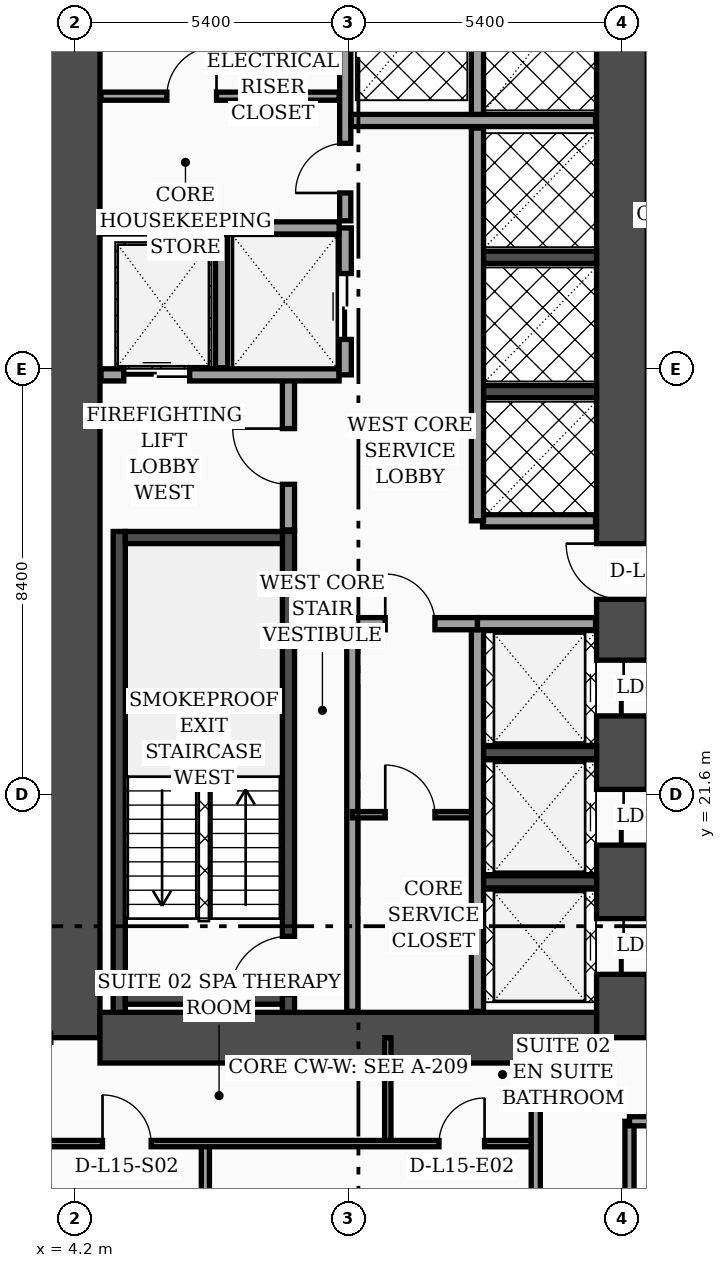
"""IFC4 building model, lengths in metres.
Left out: names, types, materials, properties, quantities, classifications, styles, units other than length and angle.
Written with IfcOpenShell. Run it as: python <this file> out.ifc"""

import sys

from ifc_helpers import new_model, si_unit, direction, frame, frame_2d, origin, place, context, subcontext, project, spatial, rectangle, extrude, element, fill, save


model = new_model("IFC4")
c1 = context("Model", 3, precision=1e-05, world=origin(), true_north=direction((0.0, 1.0)))
c2 = subcontext(c1, "Body", "Model", "MODEL_VIEW")
j1 = project(units=[si_unit("LENGTHUNIT", "METRE"), si_unit("PLANEANGLEUNIT", "RADIAN")], contexts=[c1])
p1 = place(None, origin())
s1 = spatial("IfcSite", under=j1, at=p1, CompositionType="ELEMENT")
p2 = place(p1, origin())
s2 = spatial("IfcBuilding", under=s1, at=p2, CompositionType="ELEMENT")
p3 = place(p2, frame((0.0, 0.0, 66.0)))
s3 = spatial("IfcBuildingStorey", under=s2, at=p3, CompositionType="ELEMENT", Elevation=66.0)
p4 = place(p3, frame((4.2, 16.8, 0.0), z_axis=(0.0, 0.0, 1.0), x_axis=(0.0, 1.0, 0.0)))
e1 = element("IfcWall", 1, at=p4, inside=s3, PredefinedType="SHEAR", context=c2, shape_type="SweptSolid", body=[
    extrude(rectangle(XDim=21.6, YDim=1.0, at=frame_2d((10.8, 0.0))), origin(), (0.0, 0.0, 1.0), 3.56),
])
p5 = place(p3, frame((15.0, 16.8, 0.0), z_axis=(0.0, 0.0, 1.0), x_axis=(0.0, 1.0, 0.0)))
e2 = element("IfcWall", 2, at=p5, inside=s3, PredefinedType="SHEAR", context=c2, shape_type="SweptSolid", body=[
    extrude(rectangle(XDim=21.6, YDim=1.0, at=frame_2d((10.8, 0.0))), origin(), (0.0, 0.0, 1.0), 3.56),
])
p6 = place(p5, frame((8.65, 0.0, 0.0)))
e3 = element("IfcOpeningElement", 3, at=p6, cuts=e2, PredefinedType="OPENING", context=c2, shape_type="SweptSolid", body=[
    extrude(rectangle(XDim=1.1, YDim=2.2, at=frame_2d((0.55, 1.1))), frame((0.0, 0.51, 0.0), z_axis=(0.0, -1.0, 0.0), x_axis=(1.0, 0.0, 0.0)), (0.0, 0.0, 1.0), 1.02),
])
p7 = place(p5, frame((1.25, 0.0, 0.0)))
e4 = element("IfcOpeningElement", 4, at=p7, cuts=e2, PredefinedType="OPENING", context=c2, shape_type="SweptSolid", body=[
    extrude(rectangle(XDim=1.1, YDim=2.2, at=frame_2d((0.55, 1.1))), frame((0.0, 0.51, 0.0), z_axis=(0.0, -1.0, 0.0), x_axis=(1.0, 0.0, 0.0)), (0.0, 0.0, 1.0), 1.02),
])
p8 = place(p5, frame((3.8, 0.0, 0.0)))
e5 = element("IfcOpeningElement", 5, at=p8, cuts=e2, PredefinedType="OPENING", context=c2, shape_type="SweptSolid", body=[
    extrude(rectangle(XDim=1.1, YDim=2.2, at=frame_2d((0.55, 1.1))), frame((0.0, 0.51, 0.0), z_axis=(0.0, -1.0, 0.0), x_axis=(1.0, 0.0, 0.0)), (0.0, 0.0, 1.0), 1.02),
])
p9 = place(p5, frame((6.35, 0.0, 0.0)))
e6 = element("IfcOpeningElement", 6, at=p9, cuts=e2, PredefinedType="OPENING", context=c2, shape_type="SweptSolid", body=[
    extrude(rectangle(XDim=1.1, YDim=2.2, at=frame_2d((0.55, 1.1))), frame((0.0, 0.51, 0.0), z_axis=(0.0, -1.0, 0.0), x_axis=(1.0, 0.0, 0.0)), (0.0, 0.0, 1.0), 1.02),
])
p10 = place(p3, frame((4.7, 16.8, 0.0), z_axis=(0.0, 0.0, 1.0), x_axis=(1.0, 0.0, 0.0)))
e7 = element("IfcWall", 7, at=p10, inside=s3, PredefinedType="SHEAR", context=c2, shape_type="SweptSolid", body=[
    extrude(rectangle(XDim=9.8, YDim=1.0, at=frame_2d((4.9, 0.0))), origin(), (0.0, 0.0, 1.0), 3.56),
])
p11 = place(p3, frame((5.08, 17.3, 0.0), z_axis=(0.0, 0.0, 1.0), x_axis=(0.0, 1.0, 0.0)))
e8 = element("IfcWall", 8, at=p11, inside=s3, PredefinedType="SOLIDWALL", context=c2, shape_type="SweptSolid", body=[
    extrude(rectangle(XDim=9.49, YDim=0.24, at=frame_2d((4.745, 0.0))), origin(), (0.0, 0.0, 1.0), 3.56),
])
p12 = place(p3, frame((8.42, 17.3, 0.0), z_axis=(0.0, 0.0, 1.0), x_axis=(0.0, 1.0, 0.0)))
e9 = element("IfcWall", 9, at=p12, inside=s3, PredefinedType="SOLIDWALL", context=c2, shape_type="SweptSolid", body=[
    extrude(rectangle(XDim=9.49, YDim=0.24, at=frame_2d((4.745, 0.0))), origin(), (0.0, 0.0, 1.0), 3.56),
])
p13 = place(p12, frame((0.35, 0.0, 0.0)))
e10 = element("IfcOpeningElement", 10, at=p13, cuts=e9, PredefinedType="OPENING", context=c2, shape_type="SweptSolid", body=[
    extrude(rectangle(XDim=1.15, YDim=2.2, at=frame_2d((0.575, 1.1))), frame((0.0, 0.13, 0.0), z_axis=(0.0, -1.0, 0.0), x_axis=(1.0, 0.0, 0.0)), (0.0, 0.0, 1.0), 0.26),
])
for number, where, z_axis, x_axis in (
    (11, (5.2, 17.58, 0.0), (0.0, 0.0, 1.0), (1.0, 0.0, 0.0)),
    (12, (5.2, 26.67, 0.0), (0.0, 0.0, 1.0), (1.0, 0.0, 0.0)),
):
    element("IfcWall", number, at=place(p3, frame(where, z_axis=z_axis, x_axis=x_axis)), inside=s3, PredefinedType="SOLIDWALL", context=c2, shape_type="SweptSolid", body=[
        extrude(rectangle(XDim=3.1, YDim=0.24, at=frame_2d((1.55, 0.0))), origin(), (0.0, 0.0, 1.0), 3.56),
    ])
for number, where, z_axis, x_axis in (
    (13, (12.18, 19.875, 0.0), (0.0, 0.0, 1.0), (1.0, 0.0, 0.0)),
    (14, (12.18, 22.425, 0.0), (0.0, 0.0, 1.0), (1.0, 0.0, 0.0)),
    (15, (12.18, 29.55, 0.0), (0.0, 0.0, 1.0), (1.0, 0.0, 0.0)),
    (16, (12.18, 32.2, 0.0), (0.0, 0.0, 1.0), (1.0, 0.0, 0.0)),
):
    element("IfcWall", number, at=place(p3, frame(where, z_axis=z_axis, x_axis=x_axis)), inside=s3, PredefinedType="SOLIDWALL", context=c2, shape_type="SweptSolid", body=[
        extrude(rectangle(XDim=2.32, YDim=0.24, at=frame_2d((1.16, 0.0))), origin(), (0.0, 0.0, 1.0), 3.56),
    ])
p14 = place(p3, frame((8.42, 26.82, 0.0), z_axis=(0.0, 0.0, 1.0), x_axis=(0.0, 1.0, 0.0)))
e17 = element("IfcWall", 17, at=p14, inside=s3, PredefinedType="SOLIDWALL", context=c2, shape_type="SweptSolid", body=[
    extrude(rectangle(XDim=3.0, YDim=0.24, at=frame_2d((1.5, 0.0))), origin(), (0.0, 0.0, 1.0), 3.56),
])
p15 = place(p14, frame((0.9, 0.0, 0.0)))
e18 = element("IfcOpeningElement", 18, at=p15, cuts=e17, PredefinedType="OPENING", context=c2, shape_type="SweptSolid", body=[
    extrude(rectangle(XDim=1.1, YDim=2.2, at=frame_2d((0.55, 1.1))), frame((0.0, 0.13, 0.0), z_axis=(0.0, -1.0, 0.0), x_axis=(1.0, 0.0, 0.0)), (0.0, 0.0, 1.0), 0.26),
])
p16 = place(p3, frame((4.72, 29.88, 0.0), z_axis=(0.0, 0.0, 1.0), x_axis=(1.0, 0.0, 0.0)))
e19 = element("IfcWall", 19, at=p16, inside=s3, PredefinedType="SOLIDWALL", context=c2, shape_type="SweptSolid", body=[
    extrude(rectangle(XDim=4.7, YDim=0.24, at=frame_2d((2.35, 0.0))), origin(), (0.0, 0.0, 1.0), 3.56),
])
p17 = place(p16, frame((0.45, 0.0, 0.0)))
e20 = element("IfcOpeningElement", 20, at=p17, cuts=e19, PredefinedType="OPENING", context=c2, shape_type="SweptSolid", body=[
    extrude(rectangle(XDim=1.3, YDim=2.35, at=frame_2d((0.65, 1.175))), frame((0.0, 0.13, 0.0), z_axis=(0.0, -1.0, 0.0), x_axis=(1.0, 0.0, 0.0)), (0.0, 0.0, 1.0), 0.26),
])
p18 = place(p3, frame((7.1, 30.02, 0.0), z_axis=(0.0, 0.0, 1.0), x_axis=(0.0, 1.0, 0.0)))
e21 = element("IfcWall", 21, at=p18, inside=s3, PredefinedType="SOLIDWALL", context=c2, shape_type="SweptSolid", body=[
    extrude(rectangle(XDim=2.63, YDim=0.24, at=frame_2d((1.315, 0.0))), origin(), (0.0, 0.0, 1.0), 3.56),
])
p19 = place(p3, frame((9.54, 29.88, 0.0), z_axis=(0.0, 0.0, 1.0), x_axis=(0.0, 1.0, 0.0)))
e22 = element("IfcWall", 22, at=p19, inside=s3, PredefinedType="SOLIDWALL", context=c2, shape_type="SweptSolid", body=[
    extrude(rectangle(XDim=2.9, YDim=0.24, at=frame_2d((1.45, 0.0))), origin(), (0.0, 0.0, 1.0), 3.56),
])
p20 = place(p19, frame((0.7, 0.0, 0.0)))
e23 = element("IfcOpeningElement", 23, at=p20, cuts=e22, PredefinedType="OPENING", context=c2, shape_type="SweptSolid", body=[
    extrude(rectangle(XDim=1.3, YDim=2.35, at=frame_2d((0.65, 1.175))), frame((0.0, 0.13, 0.0), z_axis=(0.0, -1.0, 0.0), x_axis=(1.0, 0.0, 0.0)), (0.0, 0.0, 1.0), 0.26),
])
p21 = place(p3, frame((4.72, 32.78, 0.0), z_axis=(0.0, 0.0, 1.0), x_axis=(1.0, 0.0, 0.0)))
e24 = element("IfcWall", 24, at=p21, inside=s3, PredefinedType="SOLIDWALL", context=c2, shape_type="SweptSolid", body=[
    extrude(rectangle(XDim=4.7, YDim=0.24, at=frame_2d((2.35, 0.0))), origin(), (0.0, 0.0, 1.0), 3.56),
])
p22 = place(p3, frame((9.68, 17.32, 0.0), z_axis=(0.0, 0.0, 1.0), x_axis=(0.0, 1.0, 0.0)))
e25 = element("IfcWall", 25, at=p22, inside=s3, PredefinedType="SOLIDWALL", context=c2, shape_type="SweptSolid", body=[
    extrude(rectangle(XDim=7.68, YDim=0.22, at=frame_2d((3.84, 0.0))), origin(), (0.0, 0.0, 1.0), 3.56),
])
p23 = place(p3, frame((4.72, 35.38, 0.0), z_axis=(0.0, 0.0, 1.0), x_axis=(1.0, 0.0, 0.0)))
e26 = element("IfcWall", 26, at=p23, inside=s3, PredefinedType="PARTITIONING", context=c2, shape_type="SweptSolid", body=[
    extrude(rectangle(XDim=4.7, YDim=0.16, at=frame_2d((2.35, 0.0))), origin(), (0.0, 0.0, 1.0), 3.56),
])
p24 = place(p23, frame((1.3, 0.0, 0.0)))
e27 = element("IfcOpeningElement", 27, at=p24, cuts=e26, PredefinedType="OPENING", context=c2, shape_type="SweptSolid", body=[
    extrude(rectangle(XDim=0.98, YDim=2.15, at=frame_2d((0.49, 1.075))), frame((0.0, 0.09, 0.0), z_axis=(0.0, -1.0, 0.0), x_axis=(1.0, 0.0, 0.0)), (0.0, 0.0, 1.0), 0.18),
])
p25 = place(p3, frame((9.54, 32.92, 0.0), z_axis=(0.0, 0.0, 1.0), x_axis=(0.0, 1.0, 0.0)))
e28 = element("IfcWall", 28, at=p25, inside=s3, PredefinedType="SOLIDWALL", context=c2, shape_type="SweptSolid", body=[
    extrude(rectangle(XDim=4.96, YDim=0.22, at=frame_2d((2.48, 0.0))), origin(), (0.0, 0.0, 1.0), 3.56),
])
p26 = place(p25, frame((0.55, 0.0, 0.0)))
e29 = element("IfcOpeningElement", 29, at=p26, cuts=e28, PredefinedType="OPENING", context=c2, shape_type="SweptSolid", body=[
    extrude(rectangle(XDim=0.98, YDim=2.15, at=frame_2d((0.49, 1.075))), frame((0.0, 0.12, 0.0), z_axis=(0.0, -1.0, 0.0), x_axis=(1.0, 0.0, 0.0)), (0.0, 0.0, 1.0), 0.24),
])
p27 = place(p3, frame((9.68, 21.2, 0.0), z_axis=(0.0, 0.0, 1.0), x_axis=(1.0, 0.0, 0.0)))
e30 = element("IfcWall", 30, at=p27, inside=s3, PredefinedType="PARTITIONING", context=c2, shape_type="SweptSolid", body=[
    extrude(rectangle(XDim=2.47, YDim=0.125, at=frame_2d((1.235, 0.0))), origin(), (0.0, 0.0, 1.0), 3.56),
])
p28 = place(p27, frame((0.65, 0.0, 0.0)))
e31 = element("IfcOpeningElement", 31, at=p28, cuts=e30, PredefinedType="OPENING", context=c2, shape_type="SweptSolid", body=[
    extrude(rectangle(XDim=0.98, YDim=2.15, at=frame_2d((0.49, 1.075))), frame((0.0, 0.073, 0.0), z_axis=(0.0, -1.0, 0.0), x_axis=(1.0, 0.0, 0.0)), (0.0, 0.0, 1.0), 0.145),
])
p29 = place(p3, frame((12.15, 17.32, 0.0), z_axis=(0.0, 0.0, 1.0), x_axis=(0.0, 1.0, 0.0)))
e32 = element("IfcWall", 32, at=p29, inside=s3, PredefinedType="SOLIDWALL", context=c2, shape_type="SweptSolid", body=[
    extrude(rectangle(XDim=7.65, YDim=0.24, at=frame_2d((3.825, 0.0))), origin(), (0.0, 0.0, 1.0), 3.56),
])
p30 = place(p3, frame((9.68, 24.97, 0.0), z_axis=(0.0, 0.0, 1.0), x_axis=(1.0, 0.0, 0.0)))
e33 = element("IfcWall", 33, at=p30, inside=s3, PredefinedType="SOLIDWALL", context=c2, shape_type="SweptSolid", body=[
    extrude(rectangle(XDim=2.47, YDim=0.24, at=frame_2d((1.235, 0.0))), origin(), (0.0, 0.0, 1.0), 3.56),
])
p31 = place(p30, frame((0.65, 0.0, 0.0)))
e34 = element("IfcOpeningElement", 34, at=p31, cuts=e33, PredefinedType="OPENING", context=c2, shape_type="SweptSolid", body=[
    extrude(rectangle(XDim=0.98, YDim=2.15, at=frame_2d((0.49, 1.075))), frame((0.0, 0.13, 0.0), z_axis=(0.0, -1.0, 0.0), x_axis=(1.0, 0.0, 0.0)), (0.0, 0.0, 1.0), 0.26),
])
p32 = place(p3, frame((12.15, 24.97, 0.0), z_axis=(0.0, 0.0, 1.0), x_axis=(1.0, 0.0, 0.0)))
e35 = element("IfcWall", 35, at=p32, inside=s3, PredefinedType="SOLIDWALL", context=c2, shape_type="SweptSolid", body=[
    extrude(rectangle(XDim=2.33, YDim=0.24, at=frame_2d((1.165, 0.0))), origin(), (0.0, 0.0, 1.0), 2.84),
])
p33 = place(p3, frame((12.25, 27.0, 0.0), z_axis=(0.0, 0.0, 1.0), x_axis=(1.0, 0.0, 0.0)))
e36 = element("IfcWall", 36, at=p33, inside=s3, PredefinedType="SOLIDWALL", context=c2, shape_type="SweptSolid", body=[
    extrude(rectangle(XDim=2.23, YDim=0.24, at=frame_2d((1.115, 0.0))), origin(), (0.0, 0.0, 1.0), 3.56),
])
p34 = place(p3, frame((12.15, 27.0, 0.0), z_axis=(0.0, 0.0, 1.0), x_axis=(0.0, 1.0, 0.0)))
e37 = element("IfcWall", 37, at=p34, inside=s3, PredefinedType="SOLIDWALL", context=c2, shape_type="SweptSolid", body=[
    extrude(rectangle(XDim=7.75, YDim=0.24, at=frame_2d((3.875, 0.0))), origin(), (0.0, 0.0, 1.0), 3.56),
])
p35 = place(p3, frame((9.66, 34.9, 0.0), z_axis=(0.0, 0.0, 1.0), x_axis=(1.0, 0.0, 0.0)))
e38 = element("IfcWall", 38, at=p35, inside=s3, PredefinedType="SOLIDWALL", context=c2, shape_type="SweptSolid", body=[
    extrude(rectangle(XDim=4.82, YDim=0.24, at=frame_2d((2.41, 0.0))), origin(), (0.0, 0.0, 1.0), 3.56),
])
p36 = place(p3, frame((12.15, 35.02, 0.0), z_axis=(0.0, 0.0, 1.0), x_axis=(0.0, 1.0, 0.0)))
e39 = element("IfcWall", 39, at=p36, inside=s3, PredefinedType="SOLIDWALL", context=c2, shape_type="SweptSolid", body=[
    extrude(rectangle(XDim=2.86, YDim=0.24, at=frame_2d((1.43, 0.0))), origin(), (0.0, 0.0, 1.0), 3.56),
])
p37 = place(p3, frame((10.38, 14.71, 0.0), z_axis=(0.0, 0.0, 1.0), x_axis=(0.0, 1.0, 0.0)))
e40 = element("IfcWall", 40, at=p37, inside=s3, PredefinedType="PARTITIONING", context=c2, shape_type="SweptSolid", body=[
    extrude(rectangle(XDim=2.09, YDim=0.125, at=frame_2d((1.045, 0.0))), origin(), (0.0, 0.0, 1.0), 3.56),
])
p38 = place(p3, frame((6.78, 9.25, 0.0), z_axis=(0.0, 0.0, 1.0), x_axis=(0.0, 1.0, 0.0)))
e41 = element("IfcWall", 41, at=p38, inside=s3, PredefinedType="PARTITIONING", context=c2, shape_type="SweptSolid", body=[
    extrude(rectangle(XDim=5.46, YDim=0.16, at=frame_2d((2.73, 0.0))), origin(), (0.0, 0.0, 1.0), 3.14),
])
p39 = place(p38, frame((2.25, 0.0, 0.0)))
e42 = element("IfcOpeningElement", 42, at=p39, cuts=e41, PredefinedType="OPENING", context=c2, shape_type="SweptSolid", body=[
    extrude(rectangle(XDim=0.96, YDim=2.2, at=frame_2d((0.48, 1.1))), frame((0.0, 0.09, 0.0), z_axis=(0.0, -1.0, 0.0), x_axis=(1.0, 0.0, 0.0)), (0.0, 0.0, 1.0), 0.18),
])
p40 = place(p3, frame((0.08, 14.71, 0.0), z_axis=(0.0, 0.0, 1.0), x_axis=(1.0, 0.0, 0.0)))
e43 = element("IfcWall", 43, at=p40, inside=s3, PredefinedType="PARTITIONING", context=c2, shape_type="SweptSolid", body=[
    extrude(rectangle(XDim=13.22, YDim=0.125, at=frame_2d((6.61, 0.0))), origin(), (0.0, 0.0, 1.0), 2.84),
])
p41 = place(p40, frame((4.67, 0.0, 0.0)))
e44 = element("IfcOpeningElement", 44, at=p41, cuts=e43, PredefinedType="OPENING", context=c2, shape_type="SweptSolid", body=[
    extrude(rectangle(XDim=0.96, YDim=2.2, at=frame_2d((0.48, 1.1))), frame((0.0, 0.073, 0.0), z_axis=(0.0, -1.0, 0.0), x_axis=(1.0, 0.0, 0.0)), (0.0, 0.0, 1.0), 0.145),
])
p42 = place(p40, frame((11.31, 0.0, 0.0)))
e45 = element("IfcOpeningElement", 45, at=p42, cuts=e43, PredefinedType="OPENING", context=c2, shape_type="SweptSolid", body=[
    extrude(rectangle(XDim=0.9, YDim=2.15, at=frame_2d((0.45, 1.075))), frame((0.0, 0.073, 0.0), z_axis=(0.0, -1.0, 0.0), x_axis=(1.0, 0.0, 0.0)), (0.0, 0.0, 1.0), 0.145),
])
p43 = place(p3, frame((13.3, 2.44, 0.0), z_axis=(0.0, 0.0, 1.0), x_axis=(0.0, 1.0, 0.0)))
e46 = element("IfcWall", 46, at=p43, inside=s3, PredefinedType="PARTITIONING", context=c2, shape_type="SweptSolid", body=[
    extrude(rectangle(XDim=14.36, YDim=0.18, at=frame_2d((7.18, 0.0))), origin(), (0.0, 0.0, 1.0), 3.04),
])
p44 = place(p43, frame((3.01, 0.0, 0.0)))
e47 = element("IfcOpeningElement", 47, at=p44, cuts=e46, PredefinedType="OPENING", context=c2, shape_type="SweptSolid", body=[
    extrude(rectangle(XDim=1.02, YDim=2.2, at=frame_2d((0.51, 1.1))), frame((0.0, 0.1, 0.0), z_axis=(0.0, -1.0, 0.0), x_axis=(1.0, 0.0, 0.0)), (0.0, 0.0, 1.0), 0.2),
])
p45 = place(p43, frame((9.03, 0.0, 0.0)))
e48 = element("IfcOpeningElement", 48, at=p45, cuts=e46, PredefinedType="OPENING", context=c2, shape_type="SweptSolid", body=[
    extrude(rectangle(XDim=1.02, YDim=2.2, at=frame_2d((0.51, 1.1))), frame((0.0, 0.1, 0.0), z_axis=(0.0, -1.0, 0.0), x_axis=(1.0, 0.0, 0.0)), (0.0, 0.0, 1.0), 0.2),
])
p46 = place(p3, frame((15.15, 2.44, 0.0), z_axis=(0.0, 0.0, 1.0), x_axis=(0.0, 1.0, 0.0)))
e49 = element("IfcWall", 49, at=p46, inside=s3, PredefinedType="PARTITIONING", context=c2, shape_type="SweptSolid", body=[
    extrude(rectangle(XDim=12.71, YDim=0.18, at=frame_2d((6.355, 0.0))), origin(), (0.0, 0.0, 1.0), 3.04),
])
p47 = place(p3, frame((15.15, 15.15, 0.0), z_axis=(0.0, 0.0, 1.0), x_axis=(1.0, 0.0, 0.0)))
e50 = element("IfcWall", 50, at=p47, inside=s3, PredefinedType="PARTITIONING", context=c2, shape_type="SweptSolid", body=[
    extrude(rectangle(XDim=6.45, YDim=0.18, at=frame_2d((3.225, 0.0))), origin(), (0.0, 0.0, 1.0), 2.34),
])
p48 = place(p47, frame((1.74, 0.0, 0.0)))
e51 = element("IfcOpeningElement", 51, at=p48, cuts=e50, PredefinedType="OPENING", context=c2, shape_type="SweptSolid", body=[
    extrude(rectangle(XDim=1.02, YDim=2.2, at=frame_2d((0.51, 1.1))), frame((0.0, 0.1, 0.0), z_axis=(0.0, -1.0, 0.0), x_axis=(1.0, 0.0, 0.0)), (0.0, 0.0, 1.0), 0.2),
])
p49 = place(p15, origin())
e52 = element("IfcDoor", 52, at=p49, inside=s3, OperationType="SINGLE_SWING_RIGHT", PredefinedType="DOOR", context=c2, shape_type="SweptSolid", body=[
    extrude(rectangle(XDim=1.1, YDim=2.2, at=frame_2d((0.55, 1.1))), frame((0.0, 0.025, 0.0), z_axis=(0.0, -1.0, 0.0), x_axis=(1.0, 0.0, 0.0)), (0.0, 0.0, 1.0), 0.05),
])
fill(e18, e52)
p50 = place(p17, origin())
e53 = element("IfcDoor", 53, at=p50, inside=s3, OperationType="DOUBLE_DOOR_SLIDING", PredefinedType="DOOR", context=c2, shape_type="SweptSolid", body=[
    extrude(rectangle(XDim=1.3, YDim=2.35, at=frame_2d((0.65, 1.175))), frame((0.0, 0.025, 0.0), z_axis=(0.0, -1.0, 0.0), x_axis=(1.0, 0.0, 0.0)), (0.0, 0.0, 1.0), 0.05),
])
fill(e20, e53)
p51 = place(p20, origin())
e54 = element("IfcDoor", 54, at=p51, inside=s3, OperationType="DOUBLE_DOOR_SLIDING", PredefinedType="DOOR", context=c2, shape_type="SweptSolid", body=[
    extrude(rectangle(XDim=1.3, YDim=2.35, at=frame_2d((0.65, 1.175))), frame((0.0, 0.025, 0.0), z_axis=(0.0, -1.0, 0.0), x_axis=(1.0, 0.0, 0.0)), (0.0, 0.0, 1.0), 0.05),
])
fill(e23, e54)
p52 = place(p24, origin())
e55 = element("IfcDoor", 55, at=p52, inside=s3, OperationType="SINGLE_SWING_RIGHT", PredefinedType="DOOR", context=c2, shape_type="SweptSolid", body=[
    extrude(rectangle(XDim=0.98, YDim=2.15, at=frame_2d((0.49, 1.075))), frame((0.0, 0.025, 0.0), z_axis=(0.0, -1.0, 0.0), x_axis=(1.0, 0.0, 0.0)), (0.0, 0.0, 1.0), 0.05),
])
fill(e27, e55)
p53 = place(p26, origin())
e56 = element("IfcDoor", 56, at=p53, inside=s3, OperationType="SINGLE_SWING_LEFT", PredefinedType="DOOR", context=c2, shape_type="SweptSolid", body=[
    extrude(rectangle(XDim=0.98, YDim=2.15, at=frame_2d((0.49, 1.075))), frame((0.0, 0.025, 0.0), z_axis=(0.0, -1.0, 0.0), x_axis=(1.0, 0.0, 0.0)), (0.0, 0.0, 1.0), 0.05),
])
fill(e29, e56)
p54 = place(p28, origin())
e57 = element("IfcDoor", 57, at=p54, inside=s3, OperationType="SINGLE_SWING_LEFT", PredefinedType="DOOR", context=c2, shape_type="SweptSolid", body=[
    extrude(rectangle(XDim=0.98, YDim=2.15, at=frame_2d((0.49, 1.075))), frame((0.0, 0.025, 0.0), z_axis=(0.0, -1.0, 0.0), x_axis=(1.0, 0.0, 0.0)), (0.0, 0.0, 1.0), 0.05),
])
fill(e31, e57)
p55 = place(p31, origin())
e58 = element("IfcDoor", 58, at=p55, inside=s3, OperationType="SINGLE_SWING_LEFT", PredefinedType="DOOR", context=c2, shape_type="SweptSolid", body=[
    extrude(rectangle(XDim=0.98, YDim=2.15, at=frame_2d((0.49, 1.075))), frame((0.0, 0.025, 0.0), z_axis=(0.0, -1.0, 0.0), x_axis=(1.0, 0.0, 0.0)), (0.0, 0.0, 1.0), 0.05),
])
fill(e34, e58)
p56 = place(p41, origin())
e59 = element("IfcDoor", 59, at=p56, inside=s3, OperationType="SINGLE_SWING_LEFT", PredefinedType="DOOR", context=c2, shape_type="SweptSolid", body=[
    extrude(rectangle(XDim=0.96, YDim=2.2, at=frame_2d((0.48, 1.1))), frame((0.0, 0.025, 0.0), z_axis=(0.0, -1.0, 0.0), x_axis=(1.0, 0.0, 0.0)), (0.0, 0.0, 1.0), 0.05),
])
fill(e44, e59)
p57 = place(p42, origin())
e60 = element("IfcDoor", 60, at=p57, inside=s3, OperationType="SINGLE_SWING_RIGHT", PredefinedType="DOOR", context=c2, shape_type="SweptSolid", body=[
    extrude(rectangle(XDim=0.9, YDim=2.15, at=frame_2d((0.45, 1.075))), frame((0.0, 0.025, 0.0), z_axis=(0.0, -1.0, 0.0), x_axis=(1.0, 0.0, 0.0)), (0.0, 0.0, 1.0), 0.05),
])
fill(e45, e60)
p58 = place(p13, origin())
e61 = element("IfcDoor", 61, at=p58, inside=s3, OperationType="SINGLE_SWING_LEFT", PredefinedType="DOOR", context=c2, shape_type="SweptSolid", body=[
    extrude(rectangle(XDim=1.15, YDim=2.2, at=frame_2d((0.575, 1.1))), frame((0.0, 0.025, 0.0), z_axis=(0.0, -1.0, 0.0), x_axis=(1.0, 0.0, 0.0)), (0.0, 0.0, 1.0), 0.05),
])
fill(e10, e61)
p59 = place(p6, origin())
e62 = element("IfcDoor", 62, at=p59, inside=s3, OperationType="SINGLE_SWING_RIGHT", PredefinedType="DOOR", context=c2, shape_type="SweptSolid", body=[
    extrude(rectangle(XDim=1.1, YDim=2.2, at=frame_2d((0.55, 1.1))), frame((0.0, 0.025, 0.0), z_axis=(0.0, -1.0, 0.0), x_axis=(1.0, 0.0, 0.0)), (0.0, 0.0, 1.0), 0.05),
])
fill(e3, e62)
p60 = place(p7, origin())
e63 = element("IfcDoor", 63, at=p60, inside=s3, OperationType="DOUBLE_DOOR_SLIDING", PredefinedType="DOOR", context=c2, shape_type="SweptSolid", body=[
    extrude(rectangle(XDim=1.1, YDim=2.2, at=frame_2d((0.55, 1.1))), frame((0.0, 0.025, 0.0), z_axis=(0.0, -1.0, 0.0), x_axis=(1.0, 0.0, 0.0)), (0.0, 0.0, 1.0), 0.05),
])
fill(e4, e63)
p61 = place(p8, origin())
e64 = element("IfcDoor", 64, at=p61, inside=s3, OperationType="DOUBLE_DOOR_SLIDING", PredefinedType="DOOR", context=c2, shape_type="SweptSolid", body=[
    extrude(rectangle(XDim=1.1, YDim=2.2, at=frame_2d((0.55, 1.1))), frame((0.0, 0.025, 0.0), z_axis=(0.0, -1.0, 0.0), x_axis=(1.0, 0.0, 0.0)), (0.0, 0.0, 1.0), 0.05),
])
fill(e5, e64)
p62 = place(p9, origin())
e65 = element("IfcDoor", 65, at=p62, inside=s3, OperationType="DOUBLE_DOOR_SLIDING", PredefinedType="DOOR", context=c2, shape_type="SweptSolid", body=[
    extrude(rectangle(XDim=1.1, YDim=2.2, at=frame_2d((0.55, 1.1))), frame((0.0, 0.025, 0.0), z_axis=(0.0, -1.0, 0.0), x_axis=(1.0, 0.0, 0.0)), (0.0, 0.0, 1.0), 0.05),
])
fill(e6, e65)
save(model, sys.argv[1])
